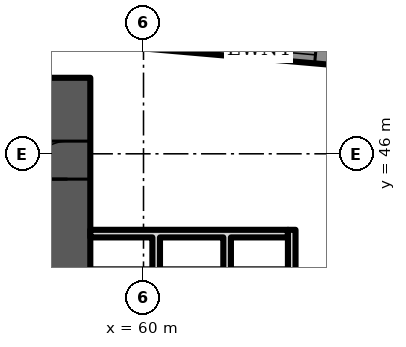
"""IFC4 building model, lengths in metres.
Left out: names, types, materials, properties, quantities, classifications, styles, units other than length and angle.
Written with IfcOpenShell. Run it as: python <this file> out.ifc"""

import sys

from ifc_helpers import new_model, si_unit, direction, frame, frame_2d, origin, place, context, subcontext, project, spatial, polyline, rectangle, outline, extrude, element, fill, save


model = new_model("IFC4")
c1 = context("Model", 3, precision=1e-05, world=origin(), true_north=direction((0.0, 1.0)))
c2 = subcontext(c1, "Body", "Model", "MODEL_VIEW")
j1 = project(units=[si_unit("LENGTHUNIT", "METRE"), si_unit("PLANEANGLEUNIT", "RADIAN")], contexts=[c1])
p1 = place(None, origin())
s1 = spatial("IfcSite", under=j1, at=p1, CompositionType="ELEMENT")
p2 = place(p1, origin())
s2 = spatial("IfcBuilding", under=s1, at=p2, CompositionType="ELEMENT")
p3 = place(p2, frame((0.0, 0.0, 27.5)))
s3 = spatial("IfcBuildingStorey", under=s2, at=p3, CompositionType="ELEMENT", Elevation=27.5)
p4 = place(p3, frame((66.058, 48.469, 0.0), z_axis=(0.0, 0.0, 1.0), x_axis=(-0.996195, 0.087158, 0.0)))
e1 = element("IfcWall", 1, at=p4, inside=s3, PredefinedType="SOLIDWALL", context=c2, shape_type="SweptSolid", body=[
    extrude(rectangle(XDim=6.081, YDim=0.45, at=frame_2d((3.041, 0.0))), origin(), (0.0, 0.0, 1.0), 5.2),
])
p5 = place(p4, frame((1.541, 0.0, 1.0)))
e2 = element("IfcOpeningElement", 2, at=p5, cuts=e1, PredefinedType="OPENING", context=c2, shape_type="SweptSolid", body=[
    extrude(rectangle(XDim=3.0, YDim=3.2, at=frame_2d((1.5, 1.6))), frame((0.0, 0.235, 0.0), z_axis=(0.0, -1.0, 0.0), x_axis=(1.0, 0.0, 0.0)), (0.0, 0.0, 1.0), 0.47),
])
p6 = place(p3, frame((58.0, 35.2, 0.0), z_axis=(0.0, 0.0, 1.0), x_axis=(0.0, 1.0, 0.0)))
e3 = element("IfcWall", 3, at=p6, inside=s3, PredefinedType="SHEAR", context=c2, shape_type="SweptSolid", body=[
    extrude(rectangle(XDim=12.8, YDim=1.2, at=frame_2d((6.4, 0.0))), origin(), (0.0, 0.0, 1.0), 5.2),
])
p7 = place(p6, frame((10.134, 0.0, 0.0)))
e4 = element("IfcOpeningElement", 4, at=p7, cuts=e3, PredefinedType="OPENING", context=c2, shape_type="SweptSolid", body=[
    extrude(rectangle(XDim=1.0, YDim=2.1, at=frame_2d((0.5, 1.05))), frame((0.0, 0.61, 0.0), z_axis=(0.0, -1.0, 0.0), x_axis=(1.0, 0.0, 0.0)), (0.0, 0.0, 1.0), 1.22),
])
p8 = place(p6, frame((3.2, 0.0, 0.0)))
e5 = element("IfcOpeningElement", 5, at=p8, cuts=e3, PredefinedType="OPENING", context=c2, shape_type="SweptSolid", body=[
    extrude(rectangle(XDim=1.1, YDim=2.1, at=frame_2d((0.55, 1.05))), frame((0.0, 0.61, 0.0), z_axis=(0.0, -1.0, 0.0), x_axis=(1.0, 0.0, 0.0)), (0.0, 0.0, 1.0), 1.22),
])
p9 = place(p3, frame((0.0, 0.0, -0.0)))
e6 = element("IfcWall", 6, at=p9, inside=s3, PredefinedType="PARTITIONING", context=c2, shape_type="SweptSolid", body=[
    extrude(outline(polyline([(60.433, 40.8), (60.233, 40.8), (60.233, 43.8), (58.6, 43.8), (58.6, 44.0), (63.8, 44.0), (63.8, 43.8), (62.3, 43.8), (62.3, 40.8), (62.1, 40.8), (62.1, 43.8), (60.433, 43.8), (60.433, 40.8)])), origin(), (0.0, 0.0, 1.0), 5.2),
])
p10 = place(p3, frame((63.9, 40.6, 0.0), z_axis=(0.0, 0.0, 1.0), x_axis=(0.0, 1.0, 0.0)))
e7 = element("IfcWall", 7, at=p10, inside=s3, PredefinedType="PARTITIONING", context=c2, shape_type="SweptSolid", body=[
    extrude(rectangle(XDim=3.4, YDim=0.2, at=frame_2d((1.7, 0.0))), origin(), (0.0, 0.0, 1.0), 5.2),
])
p11 = place(p5, origin())
e8 = element("IfcWindow", 8, at=p11, inside=s3, PartitioningType="SINGLE_PANEL", PredefinedType="WINDOW", context=c2, shape_type="SweptSolid", body=[
    extrude(rectangle(XDim=3.0, YDim=3.2, at=frame_2d((1.5, 1.6))), frame((0.0, 0.105, 0.0), z_axis=(0.0, -1.0, 0.0), x_axis=(1.0, 0.0, 0.0)), (0.0, 0.0, 1.0), 0.06),
])
fill(e2, e8)
p12 = place(p7, origin())
e9 = element("IfcDoor", 9, at=p12, inside=s3, OperationType="SINGLE_SWING_LEFT", PredefinedType="DOOR", context=c2, shape_type="SweptSolid", body=[
    extrude(rectangle(XDim=1.0, YDim=2.1, at=frame_2d((0.5, 1.05))), frame((0.0, 0.6, 0.0), z_axis=(0.0, -1.0, 0.0), x_axis=(1.0, 0.0, 0.0)), (0.0, 0.0, 1.0), 1.199),
])
fill(e4, e9)
save(model, sys.argv[1])
